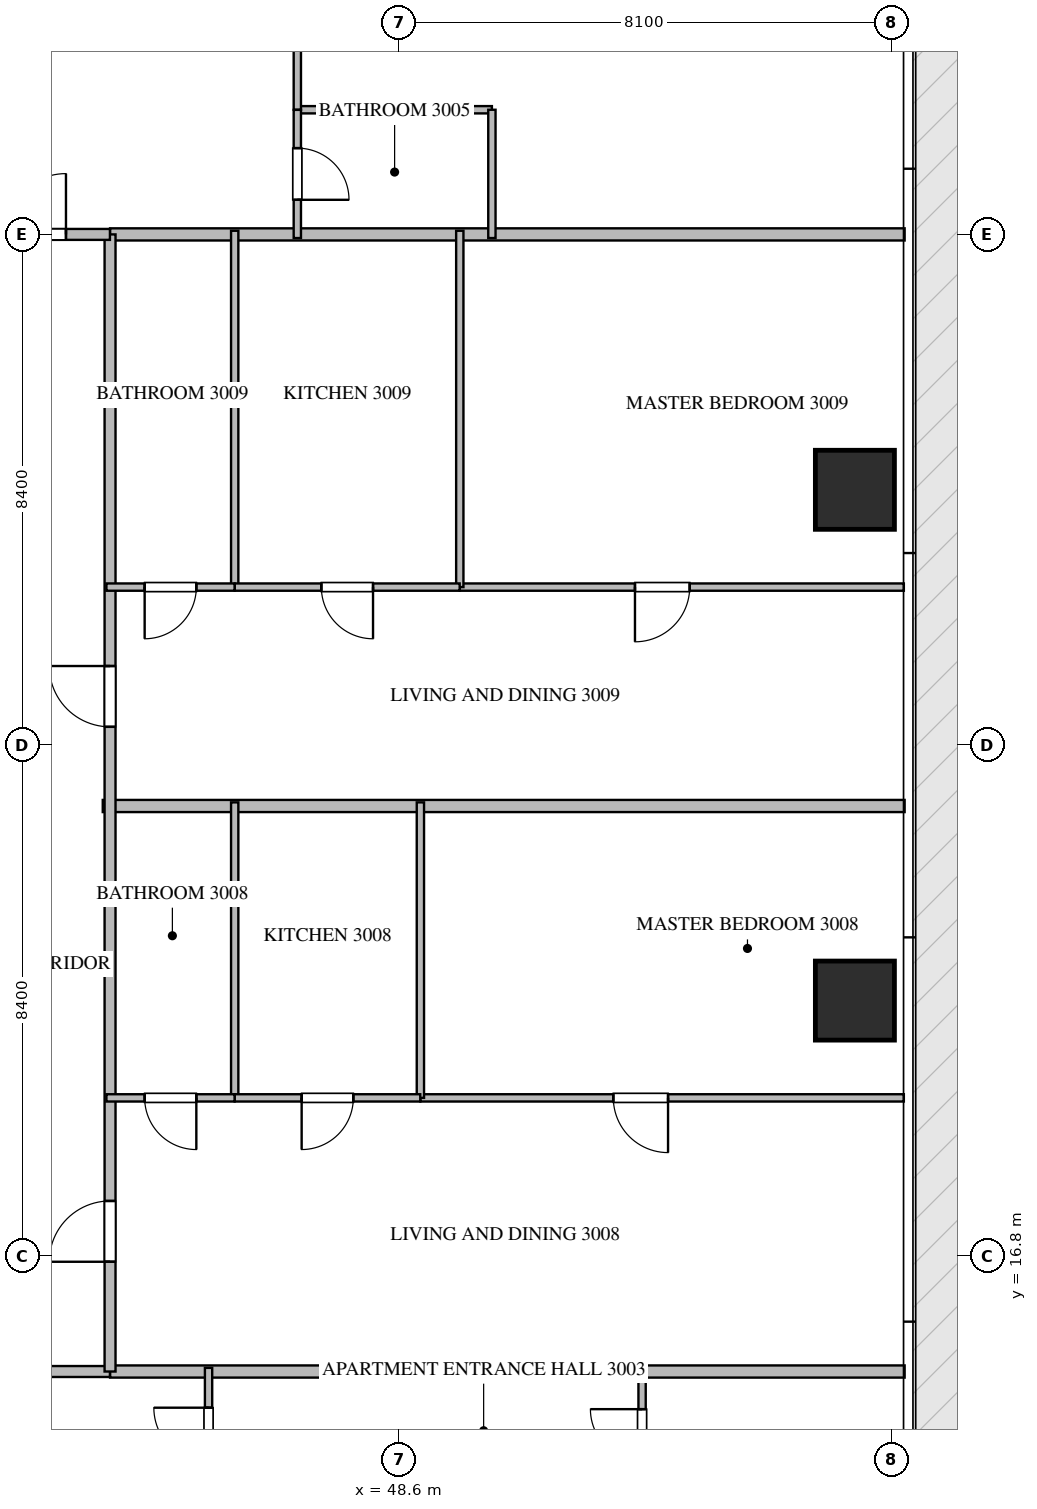
"""IFC4 building model, lengths in metres.
Left out: names, types, materials, properties, quantities, classifications, styles, units other than length and angle.
Written with IfcOpenShell. Run it as: python <this file> out.ifc"""

import sys

from ifc_helpers import new_model, si_unit, direction, frame, frame_2d, origin, origin_2d, place, context, subcontext, project, spatial, rectangle, extrude, source, transform, mapped, element, fill, save


model = new_model("IFC4")
c1 = context("Model", 3, precision=1e-05, world=origin(), true_north=direction((0.0, 1.0)))
c2 = subcontext(c1, "Body", "Model", "MODEL_VIEW")
j1 = project(units=[si_unit("LENGTHUNIT", "METRE"), si_unit("PLANEANGLEUNIT", "RADIAN")], contexts=[c1])
p1 = place(None, origin())
s1 = spatial("IfcSite", under=j1, at=p1, CompositionType="ELEMENT")
p2 = place(p1, origin())
s2 = spatial("IfcBuilding", under=s1, at=p2, CompositionType="ELEMENT")
p3 = place(p2, frame((0.0, 0.0, 123.9)))
s3 = spatial("IfcBuildingStorey", under=s2, at=p3, CompositionType="ELEMENT", Elevation=123.9)
m1 = source(origin(), c2, "Body", "SweptSolid", [
    extrude(rectangle(XDim=1.3, YDim=1.3, at=origin_2d()), origin(), (0.0, 0.0, 1.0), 3.75),
])
for number, where, z_axis, x_axis in (
    (1, (56.1, 21.0, -0.26), (0.0, 0.0, 1.0), (1.0, 0.0, 0.0)),
    (2, (56.1, 29.4, -0.26), (0.0, 0.0, 1.0), (1.0, 0.0, 0.0)),
):
    element("IfcColumn", number, at=place(p3, frame(where, z_axis=z_axis, x_axis=x_axis)), inside=s3, PredefinedType="COLUMN", context=c2, shape_type="MappedRepresentation", body=[
        mapped(m1, transform((0.0, 0.0, 0.0), scale=1.0)),
    ])
p4 = place(p3, frame((43.73, 24.2, 0.0), z_axis=(0.0, 0.0, 1.0), x_axis=(1.0, 0.0, 0.0)))
e3 = element("IfcWall", 3, at=p4, inside=s3, PredefinedType="PARTITIONING", context=c2, shape_type="SweptSolid", body=[
    extrude(rectangle(XDim=13.188, YDim=0.2, at=frame_2d((6.594, 0.0))), origin(), (0.0, 0.0, 1.0), 3.49),
])
for number, where, z_axis, x_axis in (
    (4, (43.85, 14.9, 0.0), (0.0, 0.0, 1.0), (1.0, 0.0, 0.0)),
    (5, (43.85, 33.6, 0.0), (0.0, 0.0, 1.0), (1.0, 0.0, 0.0)),
):
    element("IfcWall", number, at=place(p3, frame(where, z_axis=z_axis, x_axis=x_axis)), inside=s3, PredefinedType="PARTITIONING", context=c2, shape_type="SweptSolid", body=[
        extrude(rectangle(XDim=13.068, YDim=0.2, at=frame_2d((6.534, 0.0))), origin(), (0.0, 0.0, 1.0), 3.49),
    ])
p5 = place(p3, frame((20.952, 14.9, 0.0), z_axis=(0.0, 0.0, 1.0), x_axis=(1.0, 0.0, 0.0)))
e6 = element("IfcWall", 6, at=p5, inside=s3, PredefinedType="PARTITIONING", context=c2, shape_type="SweptSolid", body=[
    extrude(rectangle(XDim=22.896, YDim=0.18, at=frame_2d((11.448, 0.0))), origin(), (0.0, 0.0, 1.0), 3.49),
])
p6 = place(p5, frame((2.781, 0.0, 0.0)))
e7 = element("IfcOpeningElement", 7, at=p6, cuts=e6, PredefinedType="OPENING", context=c2, shape_type="SweptSolid", body=[
    extrude(rectangle(XDim=1.0, YDim=2.15, at=frame_2d((0.5, 1.075))), frame((0.0, 0.1, 0.0), z_axis=(0.0, -1.0, 0.0), x_axis=(1.0, 0.0, 0.0)), (0.0, 0.0, 1.0), 0.2),
])
p7 = place(p5, frame((7.16, 0.0, 0.0)))
e8 = element("IfcOpeningElement", 8, at=p7, cuts=e6, PredefinedType="OPENING", context=c2, shape_type="SweptSolid", body=[
    extrude(rectangle(XDim=1.0, YDim=2.15, at=frame_2d((0.5, 1.075))), frame((0.0, 0.1, 0.0), z_axis=(0.0, -1.0, 0.0), x_axis=(1.0, 0.0, 0.0)), (0.0, 0.0, 1.0), 0.2),
])
p8 = place(p5, frame((19.115, 0.0, 0.0)))
e9 = element("IfcOpeningElement", 9, at=p8, cuts=e6, PredefinedType="OPENING", context=c2, shape_type="SweptSolid", body=[
    extrude(rectangle(XDim=1.0, YDim=2.15, at=frame_2d((0.5, 1.075))), frame((0.0, 0.1, 0.0), z_axis=(0.0, -1.0, 0.0), x_axis=(1.0, 0.0, 0.0)), (0.0, 0.0, 1.0), 0.2),
])
p9 = place(p3, frame((43.85, 14.9, 0.0), z_axis=(0.0, 0.0, 1.0), x_axis=(0.0, 1.0, 0.0)))
e10 = element("IfcWall", 10, at=p9, inside=s3, PredefinedType="PARTITIONING", context=c2, shape_type="SweptSolid", body=[
    extrude(rectangle(XDim=18.7, YDim=0.18, at=frame_2d((9.35, 0.0))), origin(), (0.0, 0.0, 1.0), 3.49),
])
p10 = place(p9, frame((1.805, 0.0, 0.0)))
e11 = element("IfcOpeningElement", 11, at=p10, cuts=e10, PredefinedType="OPENING", context=c2, shape_type="SweptSolid", body=[
    extrude(rectangle(XDim=1.0, YDim=2.15, at=frame_2d((0.5, 1.075))), frame((0.0, 0.1, 0.0), z_axis=(0.0, -1.0, 0.0), x_axis=(1.0, 0.0, 0.0)), (0.0, 0.0, 1.0), 0.2),
])
p11 = place(p9, frame((10.602, 0.0, 0.0)))
e12 = element("IfcOpeningElement", 12, at=p11, cuts=e10, PredefinedType="OPENING", context=c2, shape_type="SweptSolid", body=[
    extrude(rectangle(XDim=1.0, YDim=2.15, at=frame_2d((0.5, 1.075))), frame((0.0, 0.1, 0.0), z_axis=(0.0, -1.0, 0.0), x_axis=(1.0, 0.0, 0.0)), (0.0, 0.0, 1.0), 0.2),
])
p12 = place(p3, frame((41.402, 33.6, 0.0), z_axis=(0.0, 0.0, 1.0), x_axis=(1.0, 0.0, 0.0)))
e13 = element("IfcWall", 13, at=p12, inside=s3, PredefinedType="PARTITIONING", context=c2, shape_type="SweptSolid", body=[
    extrude(rectangle(XDim=2.446, YDim=0.18, at=frame_2d((1.223, 0.0))), origin(), (0.0, 0.0, 1.0), 3.49),
])
p13 = place(p12, frame((0.723, 0.0, 0.0)))
e14 = element("IfcOpeningElement", 14, at=p13, cuts=e13, PredefinedType="OPENING", context=c2, shape_type="SweptSolid", body=[
    extrude(rectangle(XDim=1.0, YDim=2.15, at=frame_2d((0.5, 1.075))), frame((0.0, 0.1, 0.0), z_axis=(0.0, -1.0, 0.0), x_axis=(1.0, 0.0, 0.0)), (0.0, 0.0, 1.0), 0.2),
])
p14 = place(p3, frame((45.47, 12.75, 0.0), z_axis=(0.0, 0.0, 1.0), x_axis=(0.0, 1.0, 0.0)))
e15 = element("IfcWall", 15, at=p14, inside=s3, PredefinedType="PARTITIONING", context=c2, shape_type="SweptSolid", body=[
    extrude(rectangle(XDim=2.21, YDim=0.12, at=frame_2d((1.105, 0.0))), origin(), (0.0, 0.0, 1.0), 3.49),
])
p15 = place(p14, frame((0.655, 0.0, 0.0)))
e16 = element("IfcOpeningElement", 16, at=p15, cuts=e15, PredefinedType="OPENING", context=c2, shape_type="SweptSolid", body=[
    extrude(rectangle(XDim=0.9, YDim=2.1, at=frame_2d((0.45, 1.05))), frame((0.0, 0.07, 0.0), z_axis=(0.0, -1.0, 0.0), x_axis=(1.0, 0.0, 0.0)), (0.0, 0.0, 1.0), 0.14),
])
p16 = place(p3, frame((52.6, 12.752, 0.0), z_axis=(0.0, 0.0, 1.0), x_axis=(0.0, 1.0, 0.0)))
e17 = element("IfcWall", 17, at=p16, inside=s3, PredefinedType="PARTITIONING", context=c2, shape_type="SweptSolid", body=[
    extrude(rectangle(XDim=2.208, YDim=0.12, at=frame_2d((1.104, 0.0))), origin(), (0.0, 0.0, 1.0), 3.49),
])
p17 = place(p16, frame((0.679, 0.0, 0.0)))
e18 = element("IfcOpeningElement", 18, at=p17, cuts=e17, PredefinedType="OPENING", context=c2, shape_type="SweptSolid", body=[
    extrude(rectangle(XDim=0.85, YDim=2.1, at=frame_2d((0.425, 1.05))), frame((0.0, 0.07, 0.0), z_axis=(0.0, -1.0, 0.0), x_axis=(1.0, 0.0, 0.0)), (0.0, 0.0, 1.0), 0.14),
])
p18 = place(p3, frame((46.93, 35.65, 0.0), z_axis=(0.0, 0.0, 1.0), x_axis=(1.0, 0.0, 0.0)))
e19 = element("IfcWall", 19, at=p18, inside=s3, PredefinedType="PARTITIONING", context=c2, shape_type="SweptSolid", body=[
    extrude(rectangle(XDim=3.2, YDim=0.12, at=frame_2d((1.6, 0.0))), origin(), (0.0, 0.0, 1.0), 3.49),
])
p19 = place(p3, frame((50.13, 35.65, 0.0), z_axis=(0.0, 0.0, 1.0), x_axis=(0.0, -1.0, 0.0)))
e20 = element("IfcWall", 20, at=p19, inside=s3, PredefinedType="PARTITIONING", context=c2, shape_type="SweptSolid", body=[
    extrude(rectangle(XDim=2.11, YDim=0.12, at=frame_2d((1.055, 0.0))), origin(), (0.0, 0.0, 1.0), 3.49),
])
p20 = place(p3, frame((46.93, 41.073, 0.0), z_axis=(0.0, 0.0, 1.0), x_axis=(0.0, -1.0, 0.0)))
e21 = element("IfcWall", 21, at=p20, inside=s3, PredefinedType="PARTITIONING", context=c2, shape_type="SweptSolid", body=[
    extrude(rectangle(XDim=5.423, YDim=0.12, at=frame_2d((2.711, 0.0))), origin(), (0.0, 0.0, 1.0), 3.49),
])
p21 = place(p20, frame((2.287, 0.0, 0.0)))
e22 = element("IfcOpeningElement", 22, at=p21, cuts=e21, PredefinedType="OPENING", context=c2, shape_type="SweptSolid", body=[
    extrude(rectangle(XDim=0.85, YDim=2.1, at=frame_2d((0.425, 1.05))), frame((0.0, 0.07, 0.0), z_axis=(0.0, -1.0, 0.0), x_axis=(1.0, 0.0, 0.0)), (0.0, 0.0, 1.0), 0.14),
])
p22 = place(p3, frame((46.93, 35.648, 0.0), z_axis=(0.0, 0.0, 1.0), x_axis=(0.0, -1.0, 0.0)))
e23 = element("IfcWall", 23, at=p22, inside=s3, PredefinedType="PARTITIONING", context=c2, shape_type="SweptSolid", body=[
    extrude(rectangle(XDim=2.108, YDim=0.12, at=frame_2d((1.054, 0.0))), origin(), (0.0, 0.0, 1.0), 3.49),
])
p23 = place(p22, frame((0.629, 0.0, 0.0)))
e24 = element("IfcOpeningElement", 24, at=p23, cuts=e23, PredefinedType="OPENING", context=c2, shape_type="SweptSolid", body=[
    extrude(rectangle(XDim=0.85, YDim=2.1, at=frame_2d((0.425, 1.05))), frame((0.0, 0.07, 0.0), z_axis=(0.0, -1.0, 0.0), x_axis=(1.0, 0.0, 0.0)), (0.0, 0.0, 1.0), 0.14),
])
p24 = place(p3, frame((56.905, 19.4, 0.0), z_axis=(0.0, 0.0, 1.0), x_axis=(-1.0, 0.0, 0.0)))
e25 = element("IfcWall", 25, at=p24, inside=s3, PredefinedType="PARTITIONING", context=c2, shape_type="SweptSolid", body=[
    extrude(rectangle(XDim=7.951, YDim=0.12, at=frame_2d((3.976, 0.0))), origin(), (0.0, 0.0, 1.0), 3.49),
])
p25 = place(p24, frame((3.878, 0.0, 0.0)))
e26 = element("IfcOpeningElement", 26, at=p25, cuts=e25, PredefinedType="OPENING", context=c2, shape_type="SweptSolid", body=[
    extrude(rectangle(XDim=0.9, YDim=2.1, at=frame_2d((0.45, 1.05))), frame((0.0, 0.07, 0.0), z_axis=(0.0, -1.0, 0.0), x_axis=(1.0, 0.0, 0.0)), (0.0, 0.0, 1.0), 0.14),
])
for number, where, z_axis, x_axis in (
    (27, (48.954, 19.4, 0.0), (0.0, 0.0, 1.0), (0.0, 1.0, 0.0)),
    (28, (45.9, 19.4, 0.0), (0.0, 0.0, 1.0), (0.0, 1.0, 0.0)),
):
    element("IfcWall", number, at=place(p3, frame(where, z_axis=z_axis, x_axis=x_axis)), inside=s3, PredefinedType="PARTITIONING", context=c2, shape_type="SweptSolid", body=[
        extrude(rectangle(XDim=4.86, YDim=0.12, at=frame_2d((2.43, 0.0))), origin(), (0.0, 0.0, 1.0), 3.49),
    ])
p26 = place(p3, frame((48.952, 19.4, 0.0), z_axis=(0.0, 0.0, 1.0), x_axis=(-1.0, 0.0, 0.0)))
e29 = element("IfcWall", 29, at=p26, inside=s3, PredefinedType="PARTITIONING", context=c2, shape_type="SweptSolid", body=[
    extrude(rectangle(XDim=3.052, YDim=0.12, at=frame_2d((1.526, 0.0))), origin(), (0.0, 0.0, 1.0), 3.49),
])
p27 = place(p26, frame((1.101, 0.0, 0.0)))
e30 = element("IfcOpeningElement", 30, at=p27, cuts=e29, PredefinedType="OPENING", context=c2, shape_type="SweptSolid", body=[
    extrude(rectangle(XDim=0.85, YDim=2.1, at=frame_2d((0.425, 1.05))), frame((0.0, 0.07, 0.0), z_axis=(0.0, -1.0, 0.0), x_axis=(1.0, 0.0, 0.0)), (0.0, 0.0, 1.0), 0.14),
])
p28 = place(p3, frame((45.898, 19.4, 0.0), z_axis=(0.0, 0.0, 1.0), x_axis=(-1.0, 0.0, 0.0)))
e31 = element("IfcWall", 31, at=p28, inside=s3, PredefinedType="PARTITIONING", context=c2, shape_type="SweptSolid", body=[
    extrude(rectangle(XDim=2.108, YDim=0.12, at=frame_2d((1.054, 0.0))), origin(), (0.0, 0.0, 1.0), 3.49),
])
p29 = place(p28, frame((0.629, 0.0, 0.0)))
e32 = element("IfcOpeningElement", 32, at=p29, cuts=e31, PredefinedType="OPENING", context=c2, shape_type="SweptSolid", body=[
    extrude(rectangle(XDim=0.85, YDim=2.1, at=frame_2d((0.425, 1.05))), frame((0.0, 0.07, 0.0), z_axis=(0.0, -1.0, 0.0), x_axis=(1.0, 0.0, 0.0)), (0.0, 0.0, 1.0), 0.14),
])
p30 = place(p3, frame((56.905, 27.8, 0.0), z_axis=(0.0, 0.0, 1.0), x_axis=(-1.0, 0.0, 0.0)))
e33 = element("IfcWall", 33, at=p30, inside=s3, PredefinedType="PARTITIONING", context=c2, shape_type="SweptSolid", body=[
    extrude(rectangle(XDim=7.303, YDim=0.12, at=frame_2d((3.651, 0.0))), origin(), (0.0, 0.0, 1.0), 3.49),
])
p31 = place(p30, frame((3.522, 0.0, 0.0)))
e34 = element("IfcOpeningElement", 34, at=p31, cuts=e33, PredefinedType="OPENING", context=c2, shape_type="SweptSolid", body=[
    extrude(rectangle(XDim=0.9, YDim=2.1, at=frame_2d((0.45, 1.05))), frame((0.0, 0.07, 0.0), z_axis=(0.0, -1.0, 0.0), x_axis=(1.0, 0.0, 0.0)), (0.0, 0.0, 1.0), 0.14),
])
for number, where, z_axis, x_axis in (
    (35, (49.602, 27.8, 0.0), (0.0, 0.0, 1.0), (0.0, 1.0, 0.0)),
    (36, (45.9, 27.8, 0.0), (0.0, 0.0, 1.0), (0.0, 1.0, 0.0)),
):
    element("IfcWall", number, at=place(p3, frame(where, z_axis=z_axis, x_axis=x_axis)), inside=s3, PredefinedType="PARTITIONING", context=c2, shape_type="SweptSolid", body=[
        extrude(rectangle(XDim=5.86, YDim=0.12, at=frame_2d((2.93, 0.0))), origin(), (0.0, 0.0, 1.0), 3.49),
    ])
p32 = place(p3, frame((49.6, 27.8, 0.0), z_axis=(0.0, 0.0, 1.0), x_axis=(-1.0, 0.0, 0.0)))
e37 = element("IfcWall", 37, at=p32, inside=s3, PredefinedType="PARTITIONING", context=c2, shape_type="SweptSolid", body=[
    extrude(rectangle(XDim=3.7, YDim=0.12, at=frame_2d((1.85, 0.0))), origin(), (0.0, 0.0, 1.0), 3.49),
])
p33 = place(p32, frame((1.425, 0.0, 0.0)))
e38 = element("IfcOpeningElement", 38, at=p33, cuts=e37, PredefinedType="OPENING", context=c2, shape_type="SweptSolid", body=[
    extrude(rectangle(XDim=0.85, YDim=2.1, at=frame_2d((0.425, 1.05))), frame((0.0, 0.07, 0.0), z_axis=(0.0, -1.0, 0.0), x_axis=(1.0, 0.0, 0.0)), (0.0, 0.0, 1.0), 0.14),
])
p34 = place(p3, frame((45.898, 27.8, 0.0), z_axis=(0.0, 0.0, 1.0), x_axis=(-1.0, 0.0, 0.0)))
e39 = element("IfcWall", 39, at=p34, inside=s3, PredefinedType="PARTITIONING", context=c2, shape_type="SweptSolid", body=[
    extrude(rectangle(XDim=2.108, YDim=0.12, at=frame_2d((1.054, 0.0))), origin(), (0.0, 0.0, 1.0), 3.49),
])
p35 = place(p34, frame((0.629, 0.0, 0.0)))
e40 = element("IfcOpeningElement", 40, at=p35, cuts=e39, PredefinedType="OPENING", context=c2, shape_type="SweptSolid", body=[
    extrude(rectangle(XDim=0.85, YDim=2.1, at=frame_2d((0.425, 1.05))), frame((0.0, 0.07, 0.0), z_axis=(0.0, -1.0, 0.0), x_axis=(1.0, 0.0, 0.0)), (0.0, 0.0, 1.0), 0.14),
])
m2 = source(origin(), c2, "Body", "SweptSolid", [
    extrude(rectangle(XDim=1.0, YDim=2.15, at=frame_2d((0.5, 1.075))), frame((0.0, 0.025, 0.0), z_axis=(0.0, -1.0, 0.0), x_axis=(1.0, 0.0, 0.0)), (0.0, 0.0, 1.0), 0.05),
])
p36 = place(p10, origin())
e41 = element("IfcDoor", 41, at=p36, inside=s3, OperationType="SINGLE_SWING_LEFT", PredefinedType="DOOR", context=c2, shape_type="MappedRepresentation", body=[
    mapped(m2, transform((0.0, 0.0, 0.0), scale=1.0)),
])
fill(e11, e41)
p37 = place(p11, origin())
e42 = element("IfcDoor", 42, at=p37, inside=s3, OperationType="SINGLE_SWING_RIGHT", PredefinedType="DOOR", context=c2, shape_type="MappedRepresentation", body=[
    mapped(m2, transform((0.0, 0.0, 0.0), scale=1.0)),
])
fill(e12, e42)
p38 = place(p13, origin())
e43 = element("IfcDoor", 43, at=p38, inside=s3, OperationType="SINGLE_SWING_RIGHT", PredefinedType="DOOR", context=c2, shape_type="MappedRepresentation", body=[
    mapped(m2, transform((0.0, 0.0, 0.0), scale=1.0)),
])
fill(e14, e43)
m3 = source(origin(), c2, "Body", "SweptSolid", [
    extrude(rectangle(XDim=0.9, YDim=2.1, at=frame_2d((0.45, 1.05))), frame((0.0, 0.025, 0.0), z_axis=(0.0, -1.0, 0.0), x_axis=(1.0, 0.0, 0.0)), (0.0, 0.0, 1.0), 0.05),
])
p39 = place(p15, origin())
e44 = element("IfcDoor", 44, at=p39, inside=s3, OperationType="SINGLE_SWING_RIGHT", PredefinedType="DOOR", context=c2, shape_type="MappedRepresentation", body=[
    mapped(m3, transform((0.0, 0.0, 0.0), scale=1.0)),
])
fill(e16, e44)
m4 = source(origin(), c2, "Body", "SweptSolid", [
    extrude(rectangle(XDim=0.85, YDim=2.1, at=frame_2d((0.425, 1.05))), frame((0.0, 0.025, 0.0), z_axis=(0.0, -1.0, 0.0), x_axis=(1.0, 0.0, 0.0)), (0.0, 0.0, 1.0), 0.05),
])
p40 = place(p17, origin())
e45 = element("IfcDoor", 45, at=p40, inside=s3, OperationType="SINGLE_SWING_RIGHT", PredefinedType="DOOR", context=c2, shape_type="MappedRepresentation", body=[
    mapped(m4, transform((0.0, 0.0, 0.0), scale=1.0)),
])
fill(e18, e45)
p41 = place(p23, origin())
e46 = element("IfcDoor", 46, at=p41, inside=s3, OperationType="SINGLE_SWING_RIGHT", PredefinedType="DOOR", context=c2, shape_type="MappedRepresentation", body=[
    mapped(m4, transform((0.0, 0.0, 0.0), scale=1.0)),
])
fill(e24, e46)
p42 = place(p25, origin())
e47 = element("IfcDoor", 47, at=p42, inside=s3, OperationType="SINGLE_SWING_LEFT", PredefinedType="DOOR", context=c2, shape_type="MappedRepresentation", body=[
    mapped(m3, transform((0.0, 0.0, 0.0), scale=1.0)),
])
fill(e26, e47)
p43 = place(p27, origin())
e48 = element("IfcDoor", 48, at=p43, inside=s3, OperationType="SINGLE_SWING_RIGHT", PredefinedType="DOOR", context=c2, shape_type="MappedRepresentation", body=[
    mapped(m4, transform((0.0, 0.0, 0.0), scale=1.0)),
])
fill(e30, e48)
p44 = place(p29, origin())
e49 = element("IfcDoor", 49, at=p44, inside=s3, OperationType="SINGLE_SWING_LEFT", PredefinedType="DOOR", context=c2, shape_type="MappedRepresentation", body=[
    mapped(m4, transform((0.0, 0.0, 0.0), scale=1.0)),
])
fill(e32, e49)
p45 = place(p31, origin())
e50 = element("IfcDoor", 50, at=p45, inside=s3, OperationType="SINGLE_SWING_RIGHT", PredefinedType="DOOR", context=c2, shape_type="MappedRepresentation", body=[
    mapped(m3, transform((0.0, 0.0, 0.0), scale=1.0)),
])
fill(e34, e50)
p46 = place(p33, origin())
e51 = element("IfcDoor", 51, at=p46, inside=s3, OperationType="SINGLE_SWING_LEFT", PredefinedType="DOOR", context=c2, shape_type="MappedRepresentation", body=[
    mapped(m4, transform((0.0, 0.0, 0.0), scale=1.0)),
])
fill(e38, e51)
p47 = place(p35, origin())
e52 = element("IfcDoor", 52, at=p47, inside=s3, OperationType="SINGLE_SWING_RIGHT", PredefinedType="DOOR", context=c2, shape_type="MappedRepresentation", body=[
    mapped(m4, transform((0.0, 0.0, 0.0), scale=1.0)),
])
fill(e40, e52)
save(model, sys.argv[1])
